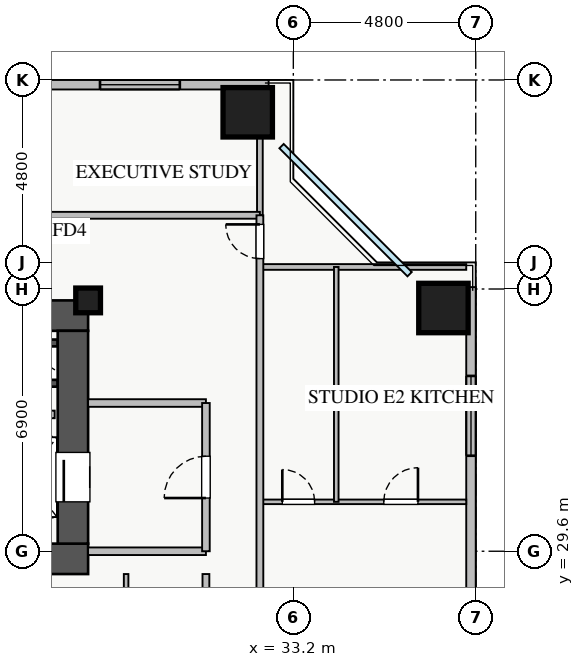
"""IFC4 building model, lengths in metres.
Left out: names, types, materials, properties, quantities, classifications, styles, units other than length and angle.
Written with IfcOpenShell. Run it as: python <this file> out.ifc"""

import sys

from ifc_helpers import new_model, si_unit, direction, frame, frame_2d, origin, origin_2d, place, context, subcontext, project, spatial, rectangle, extrude, source, transform, mapped, element, fill, save


model = new_model("IFC4")
c1 = context("Model", 3, precision=1e-05, world=origin(), true_north=direction((0.0, 1.0)))
c2 = subcontext(c1, "Body", "Model", "MODEL_VIEW")
j1 = project(units=[si_unit("LENGTHUNIT", "METRE"), si_unit("PLANEANGLEUNIT", "RADIAN")], contexts=[c1])
p1 = place(None, origin())
s1 = spatial("IfcSite", under=j1, at=p1, CompositionType="ELEMENT")
p2 = place(p1, origin())
s2 = spatial("IfcBuilding", under=s1, at=p2, CompositionType="ELEMENT")
p3 = place(p2, frame((0.0, 0.0, 29.5)))
s3 = spatial("IfcBuildingStorey", under=s2, at=p3, CompositionType="ELEMENT", Elevation=29.5)
for number, where, z_axis, x_axis in (
    (1, (25.8, 35.08, 0.0), (0.0, 0.0, 1.0), (1.0, 0.0, 0.0)),
    (2, (25.8, 34.02, 0.0), (0.0, 0.0, 1.0), (1.0, 0.0, 0.0)),
):
    element("IfcWall", number, at=place(p3, frame(where, z_axis=z_axis, x_axis=x_axis)), inside=s3, PredefinedType="SHEAR", context=c2, shape_type="SweptSolid", body=[
        extrude(rectangle(XDim=1.2, YDim=0.18, at=frame_2d((0.6, 0.0))), origin(), (0.0, 0.0, 1.0), 3.07),
    ])
p4 = place(p3, frame((10.2, 29.4, 0.0), z_axis=(0.0, 0.0, 1.0), x_axis=(1.0, 0.0, 0.0)))
e3 = element("IfcWall", 3, at=p4, inside=s3, PredefinedType="SHEAR", context=c2, shape_type="SweptSolid", body=[
    extrude(rectangle(XDim=17.6, YDim=0.8, at=frame_2d((8.8, 0.0))), origin(), (0.0, 0.0, 1.0), 3.25),
])
p5 = place(p3, frame((10.2, 35.8, 0.0), z_axis=(0.0, 0.0, 1.0), x_axis=(1.0, 0.0, 0.0)))
e4 = element("IfcWall", 4, at=p5, inside=s3, PredefinedType="SHEAR", context=c2, shape_type="SweptSolid", body=[
    extrude(rectangle(XDim=17.6, YDim=0.8, at=frame_2d((8.8, 0.0))), origin(), (0.0, 0.0, 1.0), 3.25),
])
p6 = place(p5, frame((1.15, 0.0, 0.0)))
e5 = element("IfcOpeningElement", 5, at=p6, cuts=e4, PredefinedType="OPENING", context=c2, shape_type="SweptSolid", body=[
    extrude(rectangle(XDim=1.1, YDim=2.05, at=frame_2d((0.55, 1.025))), frame((0.0, 0.41, 0.0), z_axis=(0.0, -1.0, 0.0), x_axis=(1.0, 0.0, 0.0)), (0.0, 0.0, 1.0), 0.82),
])
p7 = place(p5, frame((8.3, 0.0, 0.0)))
e6 = element("IfcOpeningElement", 6, at=p7, cuts=e4, PredefinedType="OPENING", context=c2, shape_type="SweptSolid", body=[
    extrude(rectangle(XDim=1.1, YDim=2.05, at=frame_2d((0.55, 1.025))), frame((0.0, 0.41, 0.0), z_axis=(0.0, -1.0, 0.0), x_axis=(1.0, 0.0, 0.0)), (0.0, 0.0, 1.0), 0.82),
])
p8 = place(p5, frame((10.05, 0.0, 0.0)))
e7 = element("IfcOpeningElement", 7, at=p8, cuts=e4, PredefinedType="OPENING", context=c2, shape_type="SweptSolid", body=[
    extrude(rectangle(XDim=1.1, YDim=2.05, at=frame_2d((0.55, 1.025))), frame((0.0, 0.41, 0.0), z_axis=(0.0, -1.0, 0.0), x_axis=(1.0, 0.0, 0.0)), (0.0, 0.0, 1.0), 0.82),
])
p9 = place(p5, frame((14.74, 0.0, 0.0)))
e8 = element("IfcOpeningElement", 8, at=p9, cuts=e4, PredefinedType="OPENING", context=c2, shape_type="SweptSolid", body=[
    extrude(rectangle(XDim=1.0, YDim=2.05, at=frame_2d((0.5, 1.025))), frame((0.0, 0.41, 0.0), z_axis=(0.0, -1.0, 0.0), x_axis=(1.0, 0.0, 0.0)), (0.0, 0.0, 1.0), 0.82),
])
p10 = place(p5, frame((11.835, 0.0, 0.0)))
e9 = element("IfcOpeningElement", 9, at=p10, cuts=e4, PredefinedType="OPENING", context=c2, shape_type="SweptSolid", body=[
    extrude(rectangle(XDim=1.0, YDim=2.05, at=frame_2d((0.5, 1.025))), frame((0.0, 0.41, 0.0), z_axis=(0.0, -1.0, 0.0), x_axis=(1.0, 0.0, 0.0)), (0.0, 0.0, 1.0), 0.82),
])
p11 = place(p5, frame((13.37, 0.0, 0.0)))
e10 = element("IfcOpeningElement", 10, at=p11, cuts=e4, PredefinedType="OPENING", context=c2, shape_type="SweptSolid", body=[
    extrude(rectangle(XDim=1.0, YDim=2.05, at=frame_2d((0.5, 1.025))), frame((0.0, 0.41, 0.0), z_axis=(0.0, -1.0, 0.0), x_axis=(1.0, 0.0, 0.0)), (0.0, 0.0, 1.0), 0.82),
])
p12 = place(p3, frame((27.4, 29.8, 0.0), z_axis=(0.0, 0.0, 1.0), x_axis=(0.0, 1.0, 0.0)))
e11 = element("IfcWall", 11, at=p12, inside=s3, PredefinedType="SHEAR", context=c2, shape_type="SweptSolid", body=[
    extrude(rectangle(XDim=5.6, YDim=0.8, at=frame_2d((2.8, 0.0))), origin(), (0.0, 0.0, 1.0), 3.25),
])
p13 = place(p12, frame((1.1, 0.0, 0.0)))
e12 = element("IfcOpeningElement", 12, at=p13, cuts=e11, PredefinedType="OPENING", context=c2, shape_type="SweptSolid", body=[
    extrude(rectangle(XDim=1.3, YDim=2.05, at=frame_2d((0.65, 1.025))), frame((0.0, 0.41, 0.0), z_axis=(0.0, -1.0, 0.0), x_axis=(1.0, 0.0, 0.0)), (0.0, 0.0, 1.0), 0.82),
])
m1 = source(origin(), c2, "Body", "SweptSolid", [
    extrude(rectangle(XDim=0.65, YDim=0.65, at=origin_2d()), origin(), (0.0, 0.0, 1.0), 3.25),
])
p14 = place(p3, frame((27.8, 36.2, 0.0), z_axis=(0.0, 0.0, 1.0), x_axis=(1.0, 0.0, 0.0)))
e13 = element("IfcColumn", 13, at=p14, inside=s3, PredefinedType="PILASTER", context=c2, shape_type="MappedRepresentation", body=[
    mapped(m1, transform((0.0, 0.0, 0.0), x_axis=(1.0, 0.0, 0.0), y_axis=(0.0, 1.0, 0.0), z_axis=(0.0, 0.0, 1.0), scale=1.0)),
])
m2 = source(origin(), c2, "Body", "SweptSolid", [
    extrude(rectangle(XDim=1.3, YDim=1.3, at=origin_2d()), origin(), (0.0, 0.0, 1.0), 3.25),
])
for number, where, z_axis, x_axis in (
    (14, (37.15, 36.0, 0.0), (0.0, 0.0, 1.0), (1.0, 0.0, 0.0)),
    (15, (32.0, 41.15, 0.0), (0.0, 0.0, 1.0), (1.0, 0.0, 0.0)),
):
    element("IfcColumn", number, at=place(p3, frame(where, z_axis=z_axis, x_axis=x_axis)), inside=s3, PredefinedType="COLUMN", context=c2, shape_type="MappedRepresentation", body=[
        mapped(m2, transform((0.0, 0.0, 0.0), x_axis=(1.0, 0.0, 0.0), y_axis=(0.0, 1.0, 0.0), z_axis=(0.0, 0.0, 1.0), scale=1.0)),
    ])
p15 = place(p3, frame((5.45, 41.875, 0.0), z_axis=(0.0, 0.0, 1.0), x_axis=(1.0, 0.0, 0.0)))
e16 = element("IfcWall", 16, at=p15, inside=s3, PredefinedType="STANDARD", context=c2, shape_type="SweptSolid", body=[
    extrude(rectangle(XDim=27.1, YDim=0.25, at=frame_2d((13.55, 0.0))), origin(), (0.0, 0.0, 1.0), 2.61),
])
p16 = place(p15, frame((14.4, 0.0, 0.0)))
e17 = element("IfcOpeningElement", 17, at=p16, cuts=e16, PredefinedType="OPENING", context=c2, shape_type="SweptSolid", body=[
    extrude(rectangle(XDim=1.2, YDim=2.1, at=frame_2d((0.6, 1.05))), frame((0.0, 0.135, 0.0), z_axis=(0.0, -1.0, 0.0), x_axis=(1.0, 0.0, 0.0)), (0.0, 0.0, 1.0), 0.27),
])
p17 = place(p15, frame((1.48, 0.0, 0.9)))
e18 = element("IfcOpeningElement", 18, at=p17, cuts=e16, PredefinedType="OPENING", context=c2, shape_type="SweptSolid", body=[
    extrude(rectangle(XDim=1.5, YDim=1.5, at=frame_2d((0.75, 0.75))), frame((0.0, 0.135, 0.0), z_axis=(0.0, -1.0, 0.0), x_axis=(1.0, 0.0, 0.0)), (0.0, 0.0, 1.0), 0.27),
])
p18 = place(p15, frame((9.263, 0.0, 0.9)))
e19 = element("IfcOpeningElement", 19, at=p18, cuts=e16, PredefinedType="OPENING", context=c2, shape_type="SweptSolid", body=[
    extrude(rectangle(XDim=1.8, YDim=1.45, at=frame_2d((0.9, 0.725))), frame((0.0, 0.135, 0.0), z_axis=(0.0, -1.0, 0.0), x_axis=(1.0, 0.0, 0.0)), (0.0, 0.0, 1.0), 0.27),
])
p19 = place(p15, frame((16.188, 0.0, 0.9)))
e20 = element("IfcOpeningElement", 20, at=p19, cuts=e16, PredefinedType="OPENING", context=c2, shape_type="SweptSolid", body=[
    extrude(rectangle(XDim=1.5, YDim=1.45, at=frame_2d((0.75, 0.725))), frame((0.0, 0.135, 0.0), z_axis=(0.0, -1.0, 0.0), x_axis=(1.0, 0.0, 0.0)), (0.0, 0.0, 1.0), 0.27),
])
p20 = place(p15, frame((22.663, 0.0, 0.9)))
e21 = element("IfcOpeningElement", 21, at=p20, cuts=e16, PredefinedType="OPENING", context=c2, shape_type="SweptSolid", body=[
    extrude(rectangle(XDim=2.1, YDim=1.48, at=frame_2d((1.05, 0.74))), frame((0.0, 0.135, 0.0), z_axis=(0.0, -1.0, 0.0), x_axis=(1.0, 0.0, 0.0)), (0.0, 0.0, 1.0), 0.27),
])
p21 = place(p15, frame((5.114, 0.0, 0.9)))
e22 = element("IfcOpeningElement", 22, at=p21, cuts=e16, PredefinedType="OPENING", context=c2, shape_type="SweptSolid", body=[
    extrude(rectangle(XDim=2.4, YDim=1.5, at=frame_2d((1.2, 0.75))), frame((0.0, 0.135, 0.0), z_axis=(0.0, -1.0, 0.0), x_axis=(1.0, 0.0, 0.0)), (0.0, 0.0, 1.0), 0.27),
])
p22 = place(p3, frame((37.875, 9.45, 0.0), z_axis=(0.0, 0.0, 1.0), x_axis=(0.0, 1.0, 0.0)))
e23 = element("IfcWall", 23, at=p22, inside=s3, PredefinedType="STANDARD", context=c2, shape_type="SweptSolid", body=[
    extrude(rectangle(XDim=27.1, YDim=0.25, at=frame_2d((13.55, 0.0))), origin(), (0.0, 0.0, 1.0), 2.61),
])
p23 = place(p22, frame((14.4, 0.0, 0.0)))
e24 = element("IfcOpeningElement", 24, at=p23, cuts=e23, PredefinedType="OPENING", context=c2, shape_type="SweptSolid", body=[
    extrude(rectangle(XDim=1.2, YDim=2.1, at=frame_2d((0.6, 1.05))), frame((0.0, 0.135, 0.0), z_axis=(0.0, -1.0, 0.0), x_axis=(1.0, 0.0, 0.0)), (0.0, 0.0, 1.0), 0.27),
])
p24 = place(p22, frame((2.188, 0.0, 0.9)))
e25 = element("IfcOpeningElement", 25, at=p24, cuts=e23, PredefinedType="OPENING", context=c2, shape_type="SweptSolid", body=[
    extrude(rectangle(XDim=2.4, YDim=1.48, at=frame_2d((1.2, 0.74))), frame((0.0, 0.135, 0.0), z_axis=(0.0, -1.0, 0.0), x_axis=(1.0, 0.0, 0.0)), (0.0, 0.0, 1.0), 0.27),
])
p25 = place(p22, frame((22.663, 0.0, 0.9)))
e26 = element("IfcOpeningElement", 26, at=p25, cuts=e23, PredefinedType="OPENING", context=c2, shape_type="SweptSolid", body=[
    extrude(rectangle(XDim=2.1, YDim=1.48, at=frame_2d((1.05, 0.74))), frame((0.0, 0.135, 0.0), z_axis=(0.0, -1.0, 0.0), x_axis=(1.0, 0.0, 0.0)), (0.0, 0.0, 1.0), 0.27),
])
p26 = place(p22, frame((17.365, 0.0, 0.9)))
e27 = element("IfcOpeningElement", 27, at=p26, cuts=e23, PredefinedType="OPENING", context=c2, shape_type="SweptSolid", body=[
    extrude(rectangle(XDim=0.9, YDim=1.2, at=frame_2d((0.45, 0.6))), frame((0.0, 0.135, 0.0), z_axis=(0.0, -1.0, 0.0), x_axis=(1.0, 0.0, 0.0)), (0.0, 0.0, 1.0), 0.27),
])
for number, where, z_axis, x_axis in (
    (28, (27.8, 29.6, 0.0), (0.0, 0.0, 1.0), (1.0, 0.0, 0.0)),
    (29, (27.8, 33.5, 0.0), (0.0, 0.0, 1.0), (1.0, 0.0, 0.0)),
):
    element("IfcWall", number, at=place(p3, frame(where, z_axis=z_axis, x_axis=x_axis)), inside=s3, PredefinedType="PARTITIONING", context=c2, shape_type="SweptSolid", body=[
        extrude(rectangle(XDim=3.1, YDim=0.2, at=frame_2d((1.55, 0.0))), origin(), (0.0, 0.0, 1.0), 3.07),
    ])
p27 = place(p3, frame((30.9, 29.6, 0.0), z_axis=(0.0, 0.0, 1.0), x_axis=(0.0, 1.0, 0.0)))
e30 = element("IfcWall", 30, at=p27, inside=s3, PredefinedType="PARTITIONING", context=c2, shape_type="SweptSolid", body=[
    extrude(rectangle(XDim=3.9, YDim=0.2, at=frame_2d((1.95, 0.0))), origin(), (0.0, 0.0, 1.0), 3.07),
])
p28 = place(p27, frame((1.4, 0.0, 0.0)))
e31 = element("IfcOpeningElement", 31, at=p28, cuts=e30, PredefinedType="OPENING", context=c2, shape_type="SweptSolid", body=[
    extrude(rectangle(XDim=1.1, YDim=2.05, at=frame_2d((0.55, 1.025))), frame((0.0, 0.11, 0.0), z_axis=(0.0, -1.0, 0.0), x_axis=(1.0, 0.0, 0.0)), (0.0, 0.0, 1.0), 0.22),
])
p29 = place(p3, frame((21.75, 33.2, 0.0), z_axis=(0.0, 0.0, 1.0), x_axis=(1.0, 0.0, 0.0)))
e32 = element("IfcWall", 32, at=p29, inside=s3, PredefinedType="PARTITIONING", context=c2, shape_type="SweptSolid", body=[
    extrude(rectangle(XDim=5.17, YDim=0.2, at=frame_2d((2.585, 0.0))), origin(), (0.0, 0.0, 1.0), 3.07),
])
p30 = place(p3, frame((32.32, 38.44, 0.0), z_axis=(0.0, 0.0, 1.0), x_axis=(0.0, 1.0, 0.0)))
e33 = element("IfcWall", 33, at=p30, inside=s3, PredefinedType="PARTITIONING", context=c2, shape_type="SweptSolid", body=[
    extrude(rectangle(XDim=3.31, YDim=0.15, at=frame_2d((1.655, 0.0))), origin(), (0.0, 0.0, 1.0), 3.07),
])
p31 = place(p3, frame((8.78, 38.44, 0.0), z_axis=(0.0, 0.0, 1.0), x_axis=(1.0, 0.0, 0.0)))
e34 = element("IfcWall", 34, at=p31, inside=s3, PredefinedType="PARTITIONING", context=c2, shape_type="SweptSolid", body=[
    extrude(rectangle(XDim=23.54, YDim=0.18, at=frame_2d((11.77, 0.0))), origin(), (0.0, 0.0, 1.0), 3.07),
])
p32 = place(p31, frame((4.66, 0.0, 0.0)))
e35 = element("IfcOpeningElement", 35, at=p32, cuts=e34, PredefinedType="OPENING", context=c2, shape_type="SweptSolid", body=[
    extrude(rectangle(XDim=1.0, YDim=2.05, at=frame_2d((0.5, 1.025))), frame((0.0, 0.1, 0.0), z_axis=(0.0, -1.0, 0.0), x_axis=(1.0, 0.0, 0.0)), (0.0, 0.0, 1.0), 0.2),
])
p33 = place(p31, frame((16.43, 0.0, 0.0)))
e36 = element("IfcOpeningElement", 36, at=p33, cuts=e34, PredefinedType="OPENING", context=c2, shape_type="SweptSolid", body=[
    extrude(rectangle(XDim=1.0, YDim=2.05, at=frame_2d((0.5, 1.025))), frame((0.0, 0.1, 0.0), z_axis=(0.0, -1.0, 0.0), x_axis=(1.0, 0.0, 0.0)), (0.0, 0.0, 1.0), 0.2),
])
p34 = place(p3, frame((32.32, 37.08, 0.0), z_axis=(0.0, 0.0, 1.0), x_axis=(1.0, 0.0, 0.0)))
e37 = element("IfcWall", 37, at=p34, inside=s3, PredefinedType="PARTITIONING", context=c2, shape_type="SweptSolid", body=[
    extrude(rectangle(XDim=5.43, YDim=0.15, at=frame_2d((2.715, 0.0))), origin(), (0.0, 0.0, 1.0), 3.07),
])
p35 = place(p3, frame((32.32, 30.9, 0.0), z_axis=(0.0, 0.0, 1.0), x_axis=(1.0, 0.0, 0.0)))
e38 = element("IfcWall", 38, at=p35, inside=s3, PredefinedType="PLUMBINGWALL", context=c2, shape_type="SweptSolid", body=[
    extrude(rectangle(XDim=5.43, YDim=0.12, at=frame_2d((2.715, 0.0))), origin(), (0.0, 0.0, 1.0), 3.07),
])
p36 = place(p35, frame((0.59, 0.0, 0.0)))
e39 = element("IfcOpeningElement", 39, at=p36, cuts=e38, PredefinedType="OPENING", context=c2, shape_type="SweptSolid", body=[
    extrude(rectangle(XDim=0.85, YDim=2.05, at=frame_2d((0.425, 1.025))), frame((0.0, 0.07, 0.0), z_axis=(0.0, -1.0, 0.0), x_axis=(1.0, 0.0, 0.0)), (0.0, 0.0, 1.0), 0.14),
])
p37 = place(p35, frame((3.26, 0.0, 0.0)))
e40 = element("IfcOpeningElement", 40, at=p37, cuts=e38, PredefinedType="OPENING", context=c2, shape_type="SweptSolid", body=[
    extrude(rectangle(XDim=0.9, YDim=2.05, at=frame_2d((0.45, 1.025))), frame((0.0, 0.07, 0.0), z_axis=(0.0, -1.0, 0.0), x_axis=(1.0, 0.0, 0.0)), (0.0, 0.0, 1.0), 0.14),
])
p38 = place(p3, frame((34.33, 30.9, 0.0), z_axis=(0.0, 0.0, 1.0), x_axis=(0.0, 1.0, 0.0)))
e41 = element("IfcWall", 41, at=p38, inside=s3, PredefinedType="PLUMBINGWALL", context=c2, shape_type="SweptSolid", body=[
    extrude(rectangle(XDim=6.18, YDim=0.12, at=frame_2d((3.09, 0.0))), origin(), (0.0, 0.0, 1.0), 3.07),
])
p39 = place(p3, frame((32.32, 7.21, 0.0), z_axis=(0.0, 0.0, 1.0), x_axis=(0.0, 1.0, 0.0)))
e42 = element("IfcWall", 42, at=p39, inside=s3, PredefinedType="PARTITIONING", context=c2, shape_type="SweptSolid", body=[
    extrude(rectangle(XDim=31.23, YDim=0.18, at=frame_2d((15.615, 0.0))), origin(), (0.0, 0.0, 1.0), 2.765),
])
p40 = place(p39, frame((30.09, 0.0, 0.0)))
e43 = element("IfcOpeningElement", 43, at=p40, cuts=e42, PredefinedType="OPENING", context=c2, shape_type="SweptSolid", body=[
    extrude(rectangle(XDim=0.9, YDim=2.05, at=frame_2d((0.45, 1.025))), frame((0.0, 0.1, 0.0), z_axis=(0.0, -1.0, 0.0), x_axis=(1.0, 0.0, 0.0)), (0.0, 0.0, 1.0), 0.2),
])
p41 = place(p39, frame((0.415, 0.0, 0.0)))
e44 = element("IfcOpeningElement", 44, at=p41, cuts=e42, PredefinedType="OPENING", context=c2, shape_type="SweptSolid", body=[
    extrude(rectangle(XDim=0.9, YDim=2.05, at=frame_2d((0.45, 1.025))), frame((0.0, 0.1, 0.0), z_axis=(0.0, -1.0, 0.0), x_axis=(1.0, 0.0, 0.0)), (0.0, 0.0, 1.0), 0.2),
])
p42 = place(p39, frame((8.575, 0.0, 0.0)))
e45 = element("IfcOpeningElement", 45, at=p42, cuts=e42, PredefinedType="OPENING", context=c2, shape_type="SweptSolid", body=[
    extrude(rectangle(XDim=1.0, YDim=2.05, at=frame_2d((0.5, 1.025))), frame((0.0, 0.1, 0.0), z_axis=(0.0, -1.0, 0.0), x_axis=(1.0, 0.0, 0.0)), (0.0, 0.0, 1.0), 0.2),
])
p43 = place(p39, frame((19.375, 0.0, 0.0)))
e46 = element("IfcOpeningElement", 46, at=p43, cuts=e42, PredefinedType="OPENING", context=c2, shape_type="SweptSolid", body=[
    extrude(rectangle(XDim=1.0, YDim=2.05, at=frame_2d((0.5, 1.025))), frame((0.0, 0.1, 0.0), z_axis=(0.0, -1.0, 0.0), x_axis=(1.0, 0.0, 0.0)), (0.0, 0.0, 1.0), 0.2),
])
p44 = place(p3, frame((28.8, 26.11, 0.0), z_axis=(0.0, 0.0, 1.0), x_axis=(0.0, 1.0, 0.0)))
e47 = element("IfcWall", 47, at=p44, inside=s3, PredefinedType="PLUMBINGWALL", context=c2, shape_type="SweptSolid", body=[
    extrude(rectangle(XDim=2.89, YDim=0.12, at=frame_2d((1.445, 0.0))), origin(), (0.0, 0.0, 1.0), 3.07),
])
p45 = place(p3, frame((30.9, 17.0, 0.0), z_axis=(0.0, 0.0, 1.0), x_axis=(0.0, 1.0, 0.0)))
e48 = element("IfcWall", 48, at=p45, inside=s3, PredefinedType="PARTITIONING", context=c2, shape_type="SweptSolid", body=[
    extrude(rectangle(XDim=12.0, YDim=0.18, at=frame_2d((6.0, 0.0))), origin(), (0.0, 0.0, 1.0), 3.07),
])
p46 = place(p45, frame((0.855, 0.0, 0.0)))
e49 = element("IfcOpeningElement", 49, at=p46, cuts=e48, PredefinedType="OPENING", context=c2, shape_type="SweptSolid", body=[
    extrude(rectangle(XDim=1.0, YDim=2.05, at=frame_2d((0.5, 1.025))), frame((0.0, 0.1, 0.0), z_axis=(0.0, -1.0, 0.0), x_axis=(1.0, 0.0, 0.0)), (0.0, 0.0, 1.0), 0.2),
])
p47 = place(p45, frame((6.725, 0.0, 0.0)))
e50 = element("IfcOpeningElement", 50, at=p47, cuts=e48, PredefinedType="OPENING", context=c2, shape_type="SweptSolid", body=[
    extrude(rectangle(XDim=1.0, YDim=2.05, at=frame_2d((0.5, 1.025))), frame((0.0, 0.1, 0.0), z_axis=(0.0, -1.0, 0.0), x_axis=(1.0, 0.0, 0.0)), (0.0, 0.0, 1.0), 0.2),
])
m3 = source(origin(), c2, "Body", "SweptSolid", [
    extrude(rectangle(XDim=2.1, YDim=1.48, at=frame_2d((1.05, 0.74))), frame((0.0, 0.03, 0.0), z_axis=(0.0, -1.0, 0.0), x_axis=(1.0, 0.0, 0.0)), (0.0, 0.0, 1.0), 0.06),
])
p48 = place(p20, origin())
e51 = element("IfcWindow", 51, at=p48, inside=s3, PartitioningType="TRIPLE_PANEL_VERTICAL", PredefinedType="WINDOW", context=c2, shape_type="MappedRepresentation", body=[
    mapped(m3, transform((0.0, 0.0, 0.0), x_axis=(1.0, 0.0, 0.0), y_axis=(0.0, 1.0, 0.0), z_axis=(0.0, 0.0, 1.0), scale=1.0)),
])
fill(e21, e51)
p49 = place(p25, origin())
e52 = element("IfcWindow", 52, at=p49, inside=s3, PartitioningType="TRIPLE_PANEL_VERTICAL", PredefinedType="WINDOW", context=c2, shape_type="MappedRepresentation", body=[
    mapped(m3, transform((0.0, 0.0, 0.0), x_axis=(1.0, 0.0, 0.0), y_axis=(0.0, 1.0, 0.0), z_axis=(0.0, 0.0, 1.0), scale=1.0)),
])
fill(e26, e52)
m4 = source(origin(), c2, "Body", "SweptSolid", [
    extrude(rectangle(XDim=1.3, YDim=2.05, at=frame_2d((0.65, 1.025))), frame((0.0, 0.025, 0.0), z_axis=(0.0, -1.0, 0.0), x_axis=(1.0, 0.0, 0.0)), (0.0, 0.0, 1.0), 0.05),
])
p50 = place(p13, origin())
e53 = element("IfcDoor", 53, at=p50, inside=s3, OperationType="SLIDING_TO_LEFT", PredefinedType="DOOR", context=c2, shape_type="MappedRepresentation", body=[
    mapped(m4, transform((0.0, 0.0, 0.0), x_axis=(1.0, 0.0, 0.0), y_axis=(0.0, 1.0, 0.0), z_axis=(0.0, 0.0, 1.0), scale=1.0)),
])
fill(e12, e53)
m5 = source(origin(), c2, "Body", "SweptSolid", [
    extrude(rectangle(XDim=1.1, YDim=2.05, at=frame_2d((0.55, 1.025))), frame((0.0, 0.025, 0.0), z_axis=(0.0, -1.0, 0.0), x_axis=(1.0, 0.0, 0.0)), (0.0, 0.0, 1.0), 0.05),
])
p51 = place(p28, origin())
e54 = element("IfcDoor", 54, at=p51, inside=s3, OperationType="SINGLE_SWING_LEFT", PredefinedType="DOOR", context=c2, shape_type="MappedRepresentation", body=[
    mapped(m5, transform((0.0, 0.0, 0.0), x_axis=(1.0, 0.0, 0.0), y_axis=(0.0, 1.0, 0.0), z_axis=(0.0, 0.0, 1.0), scale=1.0)),
])
fill(e31, e54)
m6 = source(origin(), c2, "Body", "SweptSolid", [
    extrude(rectangle(XDim=0.85, YDim=2.05, at=frame_2d((0.425, 1.025))), frame((0.0, 0.025, 0.0), z_axis=(0.0, -1.0, 0.0), x_axis=(1.0, 0.0, 0.0)), (0.0, 0.0, 1.0), 0.05),
])
p52 = place(p36, origin())
e55 = element("IfcDoor", 55, at=p52, inside=s3, OperationType="SINGLE_SWING_LEFT", PredefinedType="DOOR", context=c2, shape_type="MappedRepresentation", body=[
    mapped(m6, transform((0.0, 0.0, 0.0), x_axis=(1.0, 0.0, 0.0), y_axis=(0.0, 1.0, 0.0), z_axis=(0.0, 0.0, 1.0), scale=1.0)),
])
fill(e39, e55)
m7 = source(origin(), c2, "Body", "SweptSolid", [
    extrude(rectangle(XDim=0.9, YDim=2.05, at=frame_2d((0.45, 1.025))), frame((0.0, 0.025, 0.0), z_axis=(0.0, -1.0, 0.0), x_axis=(1.0, 0.0, 0.0)), (0.0, 0.0, 1.0), 0.05),
])
p53 = place(p37, origin())
e56 = element("IfcDoor", 56, at=p53, inside=s3, OperationType="SINGLE_SWING_RIGHT", PredefinedType="DOOR", context=c2, shape_type="MappedRepresentation", body=[
    mapped(m7, transform((0.0, 0.0, 0.0), x_axis=(1.0, 0.0, 0.0), y_axis=(0.0, 1.0, 0.0), z_axis=(0.0, 0.0, 1.0), scale=1.0)),
])
fill(e40, e56)
p54 = place(p40, origin())
e57 = element("IfcDoor", 57, at=p54, inside=s3, OperationType="SINGLE_SWING_RIGHT", PredefinedType="DOOR", context=c2, shape_type="MappedRepresentation", body=[
    mapped(m7, transform((0.0, 0.0, 0.0), x_axis=(1.0, 0.0, 0.0), y_axis=(0.0, 1.0, 0.0), z_axis=(0.0, 0.0, 1.0), scale=1.0)),
])
fill(e43, e57)
save(model, sys.argv[1])
